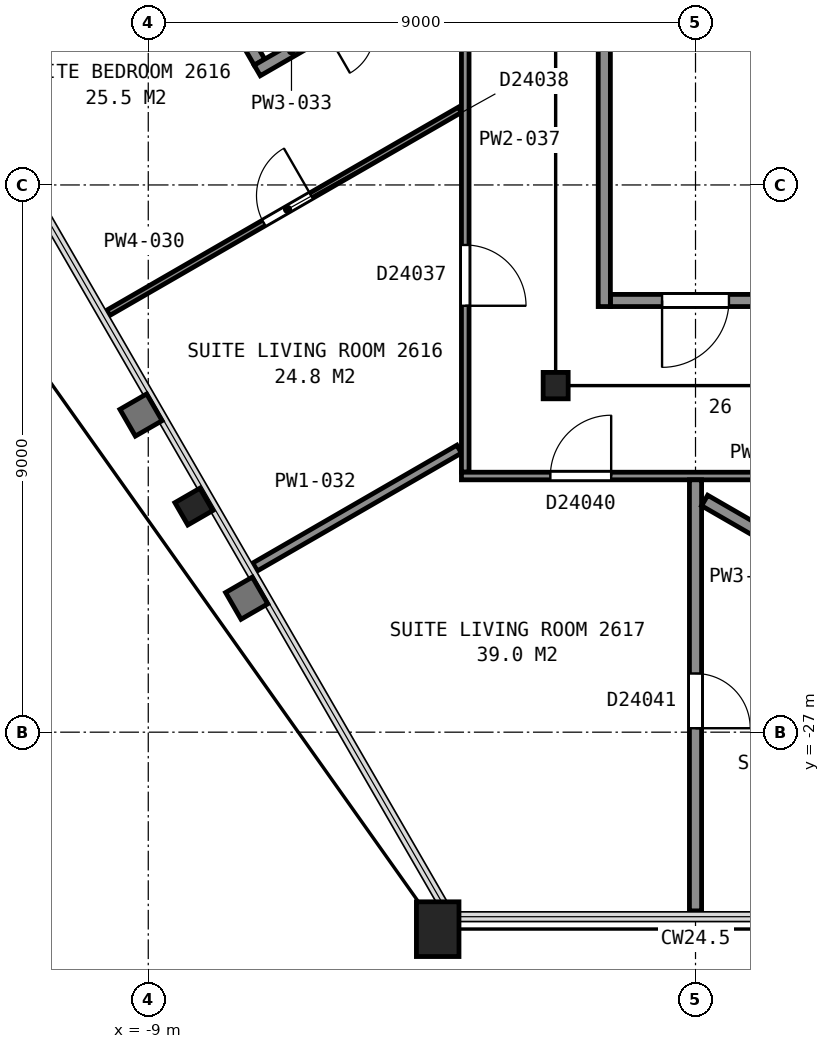
"""IFC4 building model, lengths in metres.
Left out: names, types, materials, properties, quantities, classifications, styles, units other than length and angle.
Written with IfcOpenShell. Run it as: python <this file> out.ifc"""

import sys

from ifc_helpers import new_model, si_unit, direction, frame, frame_2d, origin, origin_2d, place, context, subcontext, project, spatial, rectangle, hollow_rectangle, i_section, extrude, element, fill, save


model = new_model("IFC4")
c1 = context("Model", 3, precision=1e-05, world=origin(), true_north=direction((0.0, 1.0)))
c2 = subcontext(c1, "Body", "Model", "MODEL_VIEW")
j1 = project(units=[si_unit("LENGTHUNIT", "METRE"), si_unit("PLANEANGLEUNIT", "RADIAN")], contexts=[c1])
p1 = place(None, origin())
s1 = spatial("IfcSite", under=j1, at=p1, CompositionType="ELEMENT")
p2 = place(p1, origin())
s2 = spatial("IfcBuilding", under=s1, at=p2, CompositionType="ELEMENT")
p3 = place(p2, frame((0.0, 0.0, 110.8)))
s3 = spatial("IfcBuildingStorey", under=s2, at=p3, CompositionType="ELEMENT", Elevation=110.8)
p4 = place(p3, frame((-8.25, -23.29, 0.0), z_axis=(0.0, 0.0, 1.0), x_axis=(-0.5, 0.866025403784, 0.0)))
e1 = element("IfcColumn", 1, at=p4, inside=s3, PredefinedType="COLUMN", context=c2, shape_type="SweptSolid", body=[
    extrude(i_section(OverallWidth=0.424, OverallDepth=0.475, WebThickness=0.048, FlangeThickness=0.077, FilletRadius=0.015, at=origin_2d()), origin(), (0.0, 0.0, 1.0), 3.6),
])
p5 = place(p3, frame((-4.24, -30.24, 0.0), z_axis=(0.0, 0.0, 1.0), x_axis=(-1.0, 0.0, 0.0)))
e2 = element("IfcColumn", 2, at=p5, inside=s3, PredefinedType="COLUMN", context=c2, shape_type="SweptSolid", body=[
    extrude(hollow_rectangle(XDim=0.7, YDim=0.9, WallThickness=0.065, at=origin_2d()), origin(), (0.0, 0.0, 1.0), 3.6),
])
p6 = place(p3, frame((-2.3, -21.3, 0.0), z_axis=(0.0, 0.0, 1.0), x_axis=(-1.0, 0.0, 0.0)))
e3 = element("IfcColumn", 3, at=p6, inside=s3, PredefinedType="COLUMN", context=c2, shape_type="SweptSolid", body=[
    extrude(i_section(OverallWidth=0.411, OverallDepth=0.434, WebThickness=0.036, FlangeThickness=0.057, FilletRadius=0.015, at=origin_2d()), origin(), (0.0, 0.0, 1.0), 3.6),
])
p7 = place(p3, frame((-1.4, -19.9, 0.0), z_axis=(0.0, 0.0, 1.0), x_axis=(1.0, 0.0, 0.0)))
e4 = element("IfcWall", 4, at=p7, inside=s3, PredefinedType="PARTITIONING", context=c2, shape_type="SweptSolid", body=[
    extrude(rectangle(XDim=2.8, YDim=0.2, at=frame_2d((1.4, 0.0))), origin(), (0.0, 0.0, 1.0), 3.35),
])
p8 = place(p7, frame((0.85, 0.0, 0.0)))
e5 = element("IfcOpeningElement", 5, at=p8, cuts=e4, PredefinedType="OPENING", context=c2, shape_type="SweptSolid", body=[
    extrude(rectangle(XDim=1.1, YDim=2.1, at=frame_2d((0.55, 1.05))), frame((0.0, 0.11, 0.0), z_axis=(0.0, -1.0, 0.0), x_axis=(1.0, 0.0, 0.0)), (0.0, 0.0, 1.0), 0.22),
])
p9 = place(p3, frame((-1.5, -8.0, 0.0), z_axis=(0.0, 0.0, 1.0), x_axis=(0.0, -1.0, 0.0)))
e6 = element("IfcWall", 6, at=p9, inside=s3, PredefinedType="PARTITIONING", context=c2, shape_type="SweptSolid", body=[
    extrude(rectangle(XDim=12.0, YDim=0.2, at=frame_2d((6.0, 0.0))), origin(), (0.0, 0.0, 1.0), 3.35),
])
p10 = place(p3, frame((-12.071, -15.922, 0.0), z_axis=(0.0, 0.0, 1.0), x_axis=(0.866063309627, 0.499934339407, 0.0)))
e7 = element("IfcWall", 7, at=p10, inside=s3, PredefinedType="PARTITIONING", context=c2, shape_type="SweptSolid", body=[
    extrude(rectangle(XDim=7.348, YDim=0.15, at=frame_2d((3.674, 0.0))), origin(), (0.0, 0.0, 1.0), 2.613),
])
p11 = place(p3, frame((-9.657, -20.103, 0.0), z_axis=(0.0, 0.0, 1.0), x_axis=(0.865979781901, 0.500079011097, 0.0)))
e8 = element("IfcWall", 8, at=p11, inside=s3, PredefinedType="PARTITIONING", context=c2, shape_type="SweptSolid", body=[
    extrude(rectangle(XDim=6.678, YDim=0.1, at=frame_2d((3.339, 0.0))), origin(), (0.0, 0.0, 1.0), 2.613),
])
p12 = place(p11, frame((2.953, 0.0, 0.0)))
e9 = element("IfcOpeningElement", 9, at=p12, cuts=e8, PredefinedType="OPENING", context=c2, shape_type="SweptSolid", body=[
    extrude(rectangle(XDim=0.9, YDim=2.1, at=frame_2d((0.45, 1.05))), frame((0.0, 0.06, 0.0), z_axis=(0.0, -1.0, 0.0), x_axis=(1.0, 0.0, 0.0)), (0.0, 0.0, 1.0), 0.12),
])
p13 = place(p3, frame((-8.381, -13.884, 0.0), z_axis=(0.0, 0.0, 1.0), x_axis=(0.499795219151, -0.866143601786, 0.0)))
e10 = element("IfcWall", 10, at=p13, inside=s3, PredefinedType="PARTITIONING", context=c2, shape_type="SweptSolid", body=[
    extrude(rectangle(XDim=2.42, YDim=0.2, at=frame_2d((1.21, 0.0))), origin(), (0.0, 0.0, 1.0), 2.613),
])
p14 = place(p3, frame((-7.244, -24.283, 0.0), z_axis=(0.0, 0.0, 1.0), x_axis=(0.865997824551, 0.500047765591, 0.0)))
e11 = element("IfcWall", 11, at=p14, inside=s3, PredefinedType="PARTITIONING", context=c2, shape_type="SweptSolid", body=[
    extrude(rectangle(XDim=3.876, YDim=0.15, at=frame_2d((1.938, 0.0))), origin(), (0.0, 0.0, 1.0), 2.613),
])
p15 = place(p3, frame((-7.208, -16.117, 0.0), z_axis=(0.0, 0.0, 1.0), x_axis=(0.866091428368, 0.499885624626, 0.0)))
e12 = element("IfcWall", 12, at=p15, inside=s3, PredefinedType="PARTITIONING", context=c2, shape_type="SweptSolid", body=[
    extrude(rectangle(XDim=3.238, YDim=0.2, at=frame_2d((1.619, 0.0))), origin(), (0.0, 0.0, 1.0), 2.613),
])
p16 = place(p15, frame((1.3, 0.0, 0.0)))
e13 = element("IfcOpeningElement", 13, at=p16, cuts=e12, PredefinedType="OPENING", context=c2, shape_type="SweptSolid", body=[
    extrude(rectangle(XDim=0.8, YDim=2.1, at=frame_2d((0.4, 1.05))), frame((0.0, 0.11, 0.0), z_axis=(0.0, -1.0, 0.0), x_axis=(1.0, 0.0, 0.0)), (0.0, 0.0, 1.0), 0.22),
])
p17 = place(p3, frame((-3.787, -22.722, 0.0), z_axis=(0.0, 0.0, 1.0), x_axis=(0.0, 1.0, 0.0)))
e14 = element("IfcWall", 14, at=p17, inside=s3, PredefinedType="PARTITIONING", context=c2, shape_type="SweptSolid", body=[
    extrude(rectangle(XDim=7.197, YDim=0.125, at=frame_2d((3.599, 0.0))), origin(), (0.0, 0.0, 1.0), 2.613),
])
p18 = place(p17, frame((2.735, 0.0, 0.0)))
e15 = element("IfcOpeningElement", 15, at=p18, cuts=e14, PredefinedType="OPENING", context=c2, shape_type="SweptSolid", body=[
    extrude(rectangle(XDim=1.0, YDim=2.1, at=frame_2d((0.5, 1.05))), frame((0.0, 0.073, 0.0), z_axis=(0.0, -1.0, 0.0), x_axis=(1.0, 0.0, 0.0)), (0.0, 0.0, 1.0), 0.145),
])
p19 = place(p3, frame((3.85, -22.787, 0.0), z_axis=(0.0, 0.0, 1.0), x_axis=(-1.0, 0.0, 0.0)))
e16 = element("IfcWall", 16, at=p19, inside=s3, PredefinedType="PARTITIONING", context=c2, shape_type="SweptSolid", body=[
    extrude(rectangle(XDim=7.699, YDim=0.125, at=frame_2d((3.85, 0.0))), origin(), (0.0, 0.0, 1.0), 2.613),
])
p20 = place(p19, frame((5.237, 0.0, 0.0)))
e17 = element("IfcOpeningElement", 17, at=p20, cuts=e16, PredefinedType="OPENING", context=c2, shape_type="SweptSolid", body=[
    extrude(rectangle(XDim=1.0, YDim=2.1, at=frame_2d((0.5, 1.05))), frame((0.0, 0.073, 0.0), z_axis=(0.0, -1.0, 0.0), x_axis=(1.0, 0.0, 0.0)), (0.0, 0.0, 1.0), 0.145),
])
p21 = place(p3, frame((0.0, -22.85, 0.0), z_axis=(0.0, 0.0, 1.0), x_axis=(0.0, -1.0, 0.0)))
e18 = element("IfcWall", 18, at=p21, inside=s3, PredefinedType="PARTITIONING", context=c2, shape_type="SweptSolid", body=[
    extrude(rectangle(XDim=7.089, YDim=0.2, at=frame_2d((3.545, 0.0))), origin(), (0.0, 0.0, 1.0), 2.613),
])
p22 = place(p21, frame((3.186, 0.0, 0.0)))
e19 = element("IfcOpeningElement", 19, at=p22, cuts=e18, PredefinedType="OPENING", context=c2, shape_type="SweptSolid", body=[
    extrude(rectangle(XDim=0.9, YDim=2.1, at=frame_2d((0.45, 1.05))), frame((0.0, 0.11, 0.0), z_axis=(0.0, -1.0, 0.0), x_axis=(1.0, 0.0, 0.0)), (0.0, 0.0, 1.0), 0.22),
])
p23 = place(p3, frame((0.15, -23.19, 0.0), z_axis=(0.0, 0.0, 1.0), x_axis=(0.866061372545, -0.499937695103, 0.0)))
e20 = element("IfcWall", 20, at=p23, inside=s3, PredefinedType="PARTITIONING", context=c2, shape_type="SweptSolid", body=[
    extrude(rectangle(XDim=4.811, YDim=0.2, at=frame_2d((2.406, 0.0))), origin(), (0.0, 0.0, 1.0), 2.613),
])
p24 = place(p8, origin())
e21 = element("IfcDoor", 21, at=p24, inside=s3, OperationType="SINGLE_SWING_LEFT", PredefinedType="DOOR", context=c2, shape_type="SweptSolid", body=[
    extrude(rectangle(XDim=1.1, YDim=2.1, at=frame_2d((0.55, 1.05))), frame((0.0, 0.025, 0.0), z_axis=(0.0, -1.0, 0.0), x_axis=(1.0, 0.0, 0.0)), (0.0, 0.0, 1.0), 0.05),
])
fill(e5, e21)
p25 = place(p12, origin())
e22 = element("IfcDoor", 22, at=p25, inside=s3, OperationType="SINGLE_SWING_RIGHT", PredefinedType="DOOR", context=c2, shape_type="SweptSolid", body=[
    extrude(rectangle(XDim=0.9, YDim=2.1, at=frame_2d((0.45, 1.05))), frame((0.0, 0.025, 0.0), z_axis=(0.0, -1.0, 0.0), x_axis=(1.0, 0.0, 0.0)), (0.0, 0.0, 1.0), 0.05),
])
fill(e9, e22)
p26 = place(p18, origin())
e23 = element("IfcDoor", 23, at=p26, inside=s3, OperationType="SINGLE_SWING_LEFT", PredefinedType="DOOR", context=c2, shape_type="SweptSolid", body=[
    extrude(rectangle(XDim=1.0, YDim=2.1, at=frame_2d((0.5, 1.05))), frame((0.0, 0.025, 0.0), z_axis=(0.0, -1.0, 0.0), x_axis=(1.0, 0.0, 0.0)), (0.0, 0.0, 1.0), 0.05),
])
fill(e15, e23)
p27 = place(p20, origin())
e24 = element("IfcDoor", 24, at=p27, inside=s3, OperationType="SINGLE_SWING_LEFT", PredefinedType="DOOR", context=c2, shape_type="SweptSolid", body=[
    extrude(rectangle(XDim=1.0, YDim=2.1, at=frame_2d((0.5, 1.05))), frame((0.0, 0.025, 0.0), z_axis=(0.0, -1.0, 0.0), x_axis=(1.0, 0.0, 0.0)), (0.0, 0.0, 1.0), 0.05),
])
fill(e17, e24)
p28 = place(p22, origin())
e25 = element("IfcDoor", 25, at=p28, inside=s3, OperationType="SINGLE_SWING_RIGHT", PredefinedType="DOOR", context=c2, shape_type="SweptSolid", body=[
    extrude(rectangle(XDim=0.9, YDim=2.1, at=frame_2d((0.45, 1.05))), frame((0.0, 0.025, 0.0), z_axis=(0.0, -1.0, 0.0), x_axis=(1.0, 0.0, 0.0)), (0.0, 0.0, 1.0), 0.05),
])
fill(e19, e25)
save(model, sys.argv[1])
